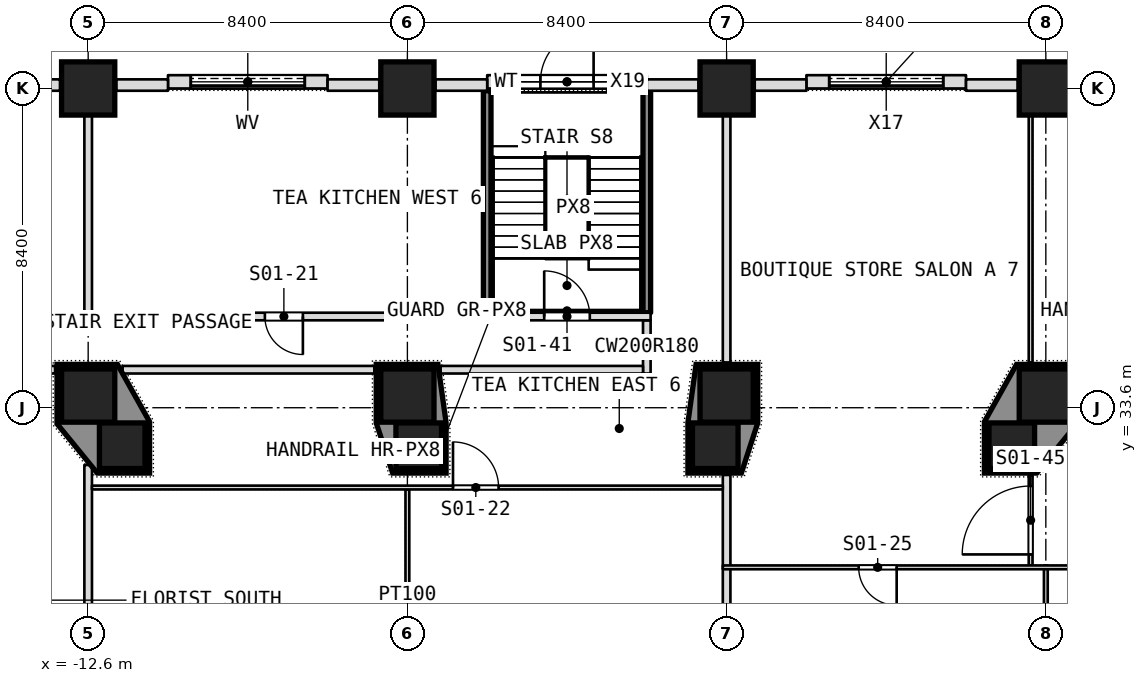
"""IFC4 building model, lengths in metres.
Left out: names, types, materials, properties, quantities, classifications, styles, units other than length and angle.
Written with IfcOpenShell. Run it as: python <this file> out.ifc"""

import sys

from ifc_helpers import new_model, si_unit, direction, frame, frame_2d, origin, origin_2d, place, context, subcontext, project, spatial, polyline, rectangle, outline, extrude, element, fill, save


model = new_model("IFC4")
c1 = context("Model", 3, precision=1e-05, world=origin(), true_north=direction((0.0, 1.0)))
c2 = subcontext(c1, "Body", "Model", "MODEL_VIEW")
j1 = project(units=[si_unit("LENGTHUNIT", "METRE"), si_unit("PLANEANGLEUNIT", "RADIAN")], contexts=[c1])
p1 = place(None, origin())
s1 = spatial("IfcSite", under=j1, at=p1, CompositionType="ELEMENT")
p2 = place(p1, origin())
s2 = spatial("IfcBuilding", under=s1, at=p2, CompositionType="ELEMENT")
p3 = place(p2, origin())
s3 = spatial("IfcBuildingStorey", under=s2, at=p3, CompositionType="ELEMENT", Elevation=0.0)
for number, where, z_axis, x_axis in (
    (1, (-12.6, 33.92, -0.3), (0.0, 0.0, 1.0), (1.0, 0.0, 0.0)),
    (2, (-4.2, 33.92, -0.3), (0.0, 0.0, 1.0), (1.0, 0.0, 0.0)),
    (3, (4.2, 33.92, -0.3), (0.0, 0.0, 1.0), (1.0, 0.0, 0.0)),
    (4, (12.6, 33.92, -0.3), (0.0, 0.0, 1.0), (1.0, 0.0, 0.0)),
    (5, (-12.6, 42.0, -0.3), (0.0, 0.0, 1.0), (1.0, 0.0, 0.0)),
    (6, (-4.2, 42.0, -0.3), (0.0, 0.0, 1.0), (1.0, 0.0, 0.0)),
    (7, (4.2, 42.0, -0.3), (0.0, 0.0, 1.0), (1.0, 0.0, 0.0)),
    (8, (12.6, 42.0, -0.3), (0.0, 0.0, 1.0), (1.0, 0.0, 0.0)),
):
    element("IfcColumn", number, at=place(p3, frame(where, z_axis=z_axis, x_axis=x_axis)), inside=s3, PredefinedType="COLUMN", context=c2, shape_type="SweptSolid", body=[
        extrude(rectangle(XDim=1.4, YDim=1.4, at=origin_2d()), origin(), (0.0, 0.0, 1.0), 8.3),
    ])
for number, where, z_axis, x_axis in (
    (9, (-11.704, 32.6, -0.3), (0.0, 0.0, 1.0), (1.0, 0.0, 0.0)),
    (10, (-3.901, 32.6, -0.3), (0.0, 0.0, 1.0), (1.0, 0.0, 0.0)),
    (11, (3.901, 32.6, -0.3), (0.0, 0.0, 1.0), (1.0, 0.0, 0.0)),
    (12, (11.704, 32.6, -0.3), (0.0, 0.0, 1.0), (1.0, 0.0, 0.0)),
):
    element("IfcColumn", number, at=place(p3, frame(where, z_axis=z_axis, x_axis=x_axis)), inside=s3, PredefinedType="COLUMN", context=c2, shape_type="SweptSolid", body=[
        extrude(rectangle(XDim=1.2, YDim=1.2, at=origin_2d()), origin(), (0.0, 0.0, 1.0), 8.3),
    ])
p4 = place(p3, frame((12.6, 25.92, 0.0), z_axis=(0.0, 0.0, 1.0), x_axis=(0.0, 1.0, 0.0)))
e13 = element("IfcWall", 13, at=p4, inside=s3, PredefinedType="PARTITIONING", context=c2, shape_type="SweptSolid", body=[
    extrude(rectangle(XDim=3.53, YDim=0.1, at=frame_2d((1.765, 0.0))), origin(), (0.0, 0.0, 1.0), 7.68),
])
p5 = place(p3, frame((12.2, 29.45, 0.0), z_axis=(0.0, 0.0, 1.0), x_axis=(0.0, 1.0, 0.0)))
e14 = element("IfcWall", 14, at=p5, inside=s3, PredefinedType="PARTITIONING", context=c2, shape_type="SweptSolid", body=[
    extrude(rectangle(XDim=2.38, YDim=0.1, at=frame_2d((1.19, 0.0))), origin(), (0.0, 0.0, 1.0), 7.68),
])
p6 = place(p5, frame((0.29, 0.0, 0.0)))
e15 = element("IfcOpeningElement", 15, at=p6, cuts=e14, PredefinedType="OPENING", context=c2, shape_type="SweptSolid", body=[
    extrude(rectangle(XDim=1.8, YDim=2.1, at=frame_2d((0.9, 1.05))), frame((0.0, 0.05, 0.0), z_axis=(0.0, -1.0, 0.0), x_axis=(1.0, 0.0, 0.0)), (0.0, 0.0, 1.0), 0.1),
])
p7 = place(p3, frame((12.2, 34.79, 0.0), z_axis=(0.0, 0.0, 1.0), x_axis=(0.0, 1.0, 0.0)))
e16 = element("IfcWall", 16, at=p7, inside=s3, PredefinedType="PARTITIONING", context=c2, shape_type="SweptSolid", body=[
    extrude(rectangle(XDim=7.51, YDim=0.1, at=frame_2d((3.755, 0.0))), origin(), (0.0, 0.0, 1.0), 7.68),
])
p8 = place(p3, frame((4.2, 21.1, 0.0), z_axis=(0.0, 0.0, 1.0), x_axis=(0.0, 1.0, 0.0)))
e17 = element("IfcWall", 17, at=p8, inside=s3, PredefinedType="PARTITIONING", context=c2, shape_type="SweptSolid", body=[
    extrude(rectangle(XDim=10.73, YDim=0.2, at=frame_2d((5.365, 0.0))), origin(), (0.0, 0.0, 1.0), 7.68),
])
p9 = place(p3, frame((4.2, 34.79, 0.0), z_axis=(0.0, 0.0, 1.0), x_axis=(0.0, 1.0, 0.0)))
e18 = element("IfcWall", 18, at=p9, inside=s3, PredefinedType="PARTITIONING", context=c2, shape_type="SweptSolid", body=[
    extrude(rectangle(XDim=7.51, YDim=0.2, at=frame_2d((3.755, 0.0))), origin(), (0.0, 0.0, 1.0), 7.68),
])
p10 = place(p3, frame((2.1, 36.1, 0.0), z_axis=(0.0, 0.0, 1.0), x_axis=(0.0, 1.0, 0.0)))
e19 = element("IfcWall", 19, at=p10, inside=s3, PredefinedType="PARTITIONING", context=c2, shape_type="SweptSolid", body=[
    extrude(rectangle(XDim=5.84, YDim=0.2, at=frame_2d((2.92, 0.0))), origin(), (0.0, 0.0, 1.0), 7.68),
])
p11 = place(p3, frame((2.1, 34.5, 0.0), z_axis=(0.0, 0.0, 1.0), x_axis=(0.0, 1.0, 0.0)))
e20 = element("IfcWall", 20, at=p11, inside=s3, PredefinedType="PARTITIONING", context=c2, shape_type="SweptSolid", body=[
    extrude(rectangle(XDim=1.4, YDim=0.2, at=frame_2d((0.7, 0.0))), origin(), (0.0, 0.0, 1.0), 7.68),
])
p12 = place(p3, frame((-2.1, 36.1, 0.0), z_axis=(0.0, 0.0, 1.0), x_axis=(0.0, 1.0, 0.0)))
e21 = element("IfcWall", 21, at=p12, inside=s3, PredefinedType="PARTITIONING", context=c2, shape_type="SweptSolid", body=[
    extrude(rectangle(XDim=5.84, YDim=0.2, at=frame_2d((2.92, 0.0))), origin(), (0.0, 0.0, 1.0), 7.68),
])
p13 = place(p3, frame((-4.2, 25.92, 0.0), z_axis=(0.0, 0.0, 1.0), x_axis=(0.0, 1.0, 0.0)))
e22 = element("IfcWall", 22, at=p13, inside=s3, PredefinedType="PARTITIONING", context=c2, shape_type="SweptSolid", body=[
    extrude(rectangle(XDim=5.53, YDim=0.1, at=frame_2d((2.765, 0.0))), origin(), (0.0, 0.0, 1.0), 7.68),
])
p14 = place(p3, frame((-12.6, 21.1, 0.0), z_axis=(0.0, 0.0, 1.0), x_axis=(0.0, 1.0, 0.0)))
e23 = element("IfcWall", 23, at=p14, inside=s3, PredefinedType="PARTITIONING", context=c2, shape_type="SweptSolid", body=[
    extrude(rectangle(XDim=10.994, YDim=0.2, at=frame_2d((5.497, 0.0))), origin(), (0.0, 0.0, 1.0), 7.68),
])
p15 = place(p3, frame((-12.6, 36.1, 0.0), z_axis=(0.0, 0.0, 1.0), x_axis=(0.0, 1.0, 0.0)))
e24 = element("IfcWall", 24, at=p15, inside=s3, PredefinedType="PARTITIONING", context=c2, shape_type="SweptSolid", body=[
    extrude(rectangle(XDim=6.2, YDim=0.2, at=frame_2d((3.1, 0.0))), origin(), (0.0, 0.0, 1.0), 7.68),
])
p16 = place(p3, frame((4.1, 29.4, 0.0), z_axis=(0.0, 0.0, 1.0), x_axis=(1.0, 0.0, 0.0)))
e25 = element("IfcWall", 25, at=p16, inside=s3, PredefinedType="PARTITIONING", context=c2, shape_type="SweptSolid", body=[
    extrude(rectangle(XDim=12.6, YDim=0.1, at=frame_2d((6.3, 0.0))), origin(), (0.0, 0.0, 1.0), 7.68),
])
p17 = place(p16, frame((3.575, 0.0, 0.0)))
e26 = element("IfcOpeningElement", 26, at=p17, cuts=e25, PredefinedType="OPENING", context=c2, shape_type="SweptSolid", body=[
    extrude(rectangle(XDim=1.0, YDim=2.1, at=frame_2d((0.5, 1.05))), frame((0.0, 0.05, 0.0), z_axis=(0.0, -1.0, 0.0), x_axis=(1.0, 0.0, 0.0)), (0.0, 0.0, 1.0), 0.1),
])
p18 = place(p3, frame((-12.5, 31.5, 0.0), z_axis=(0.0, 0.0, 1.0), x_axis=(1.0, 0.0, 0.0)))
e27 = element("IfcWall", 27, at=p18, inside=s3, PredefinedType="PARTITIONING", context=c2, shape_type="SweptSolid", body=[
    extrude(rectangle(XDim=16.6, YDim=0.1, at=frame_2d((8.3, 0.0))), origin(), (0.0, 0.0, 1.0), 7.68),
])
p19 = place(p18, frame((9.5, 0.0, 0.0)))
e28 = element("IfcOpeningElement", 28, at=p19, cuts=e27, PredefinedType="OPENING", context=c2, shape_type="SweptSolid", body=[
    extrude(rectangle(XDim=1.2, YDim=2.1, at=frame_2d((0.6, 1.05))), frame((0.0, 0.05, 0.0), z_axis=(0.0, -1.0, 0.0), x_axis=(1.0, 0.0, 0.0)), (0.0, 0.0, 1.0), 0.1),
])
p20 = place(p3, frame((-16.7, 34.6, 0.0), z_axis=(0.0, 0.0, 1.0), x_axis=(1.0, 0.0, 0.0)))
e29 = element("IfcWall", 29, at=p20, inside=s3, PredefinedType="PARTITIONING", context=c2, shape_type="SweptSolid", body=[
    extrude(rectangle(XDim=3.23, YDim=0.2, at=frame_2d((1.615, 0.0))), origin(), (0.0, 0.0, 1.0), 7.68),
])
p21 = place(p3, frame((-11.694, 34.6, 0.0), z_axis=(0.0, 0.0, 1.0), x_axis=(1.0, 0.0, 0.0)))
e30 = element("IfcWall", 30, at=p21, inside=s3, PredefinedType="PARTITIONING", context=c2, shape_type="SweptSolid", body=[
    extrude(rectangle(XDim=6.624, YDim=0.2, at=frame_2d((3.312, 0.0))), origin(), (0.0, 0.0, 1.0), 7.68),
])
p22 = place(p3, frame((-3.326, 34.6, 0.0), z_axis=(0.0, 0.0, 1.0), x_axis=(1.0, 0.0, 0.0)))
e31 = element("IfcWall", 31, at=p22, inside=s3, PredefinedType="PARTITIONING", context=c2, shape_type="SweptSolid", body=[
    extrude(rectangle(XDim=5.326, YDim=0.2, at=frame_2d((2.663, 0.0))), origin(), (0.0, 0.0, 1.0), 7.68),
])
p23 = place(p3, frame((-21.1, 36.0, 0.0), z_axis=(0.0, 0.0, 1.0), x_axis=(1.0, 0.0, 0.0)))
e32 = element("IfcWall", 32, at=p23, inside=s3, PredefinedType="PARTITIONING", context=c2, shape_type="SweptSolid", body=[
    extrude(rectangle(XDim=23.3, YDim=0.2, at=frame_2d((11.65, 0.0))), origin(), (0.0, 0.0, 1.0), 7.68),
])
p24 = place(p23, frame((1.6, 0.0, 0.0)))
e33 = element("IfcOpeningElement", 33, at=p24, cuts=e32, PredefinedType="OPENING", context=c2, shape_type="SweptSolid", body=[
    extrude(rectangle(XDim=1.2, YDim=2.1, at=frame_2d((0.6, 1.05))), frame((0.0, 0.1, 0.0), z_axis=(0.0, -1.0, 0.0), x_axis=(1.0, 0.0, 0.0)), (0.0, 0.0, 1.0), 0.2),
])
p25 = place(p23, frame((6.0, 0.0, 0.0)))
e34 = element("IfcOpeningElement", 34, at=p25, cuts=e32, PredefinedType="OPENING", context=c2, shape_type="SweptSolid", body=[
    extrude(rectangle(XDim=1.0, YDim=2.1, at=frame_2d((0.5, 1.05))), frame((0.0, 0.1, 0.0), z_axis=(0.0, -1.0, 0.0), x_axis=(1.0, 0.0, 0.0)), (0.0, 0.0, 1.0), 0.2),
])
p26 = place(p23, frame((13.15, 0.0, 0.0)))
e35 = element("IfcOpeningElement", 35, at=p26, cuts=e32, PredefinedType="OPENING", context=c2, shape_type="SweptSolid", body=[
    extrude(rectangle(XDim=1.0, YDim=2.1, at=frame_2d((0.5, 1.05))), frame((0.0, 0.1, 0.0), z_axis=(0.0, -1.0, 0.0), x_axis=(1.0, 0.0, 0.0)), (0.0, 0.0, 1.0), 0.2),
])
p27 = place(p23, frame((20.5, 0.0, 0.0)))
e36 = element("IfcOpeningElement", 36, at=p27, cuts=e32, PredefinedType="OPENING", context=c2, shape_type="SweptSolid", body=[
    extrude(rectangle(XDim=1.2, YDim=2.1, at=frame_2d((0.6, 1.05))), frame((0.0, 0.1, 0.0), z_axis=(0.0, -1.0, 0.0), x_axis=(1.0, 0.0, 0.0)), (0.0, 0.0, 1.0), 0.2),
])
p28 = place(p3, frame((-6.3, 42.175, 0.0), z_axis=(0.0, 0.0, 1.0), x_axis=(-1.0, 0.0, 0.0)))
e37 = element("IfcWall", 37, at=p28, inside=s3, PredefinedType="NOTDEFINED", context=c2, shape_type="SweptSolid", body=[
    extrude(rectangle(XDim=4.2, YDim=0.35, at=frame_2d((2.1, 0.0))), origin(), (0.0, 0.0, 1.0), 6.78),
])
p29 = place(p28, frame((0.6, 0.0, 0.0)))
e38 = element("IfcOpeningElement", 38, at=p29, cuts=e37, PredefinedType="OPENING", context=c2, shape_type="SweptSolid", body=[
    extrude(rectangle(XDim=3.0, YDim=3.0, at=frame_2d((1.5, 1.5))), frame((0.0, 0.175, 0.0), z_axis=(0.0, -1.0, 0.0), x_axis=(1.0, 0.0, 0.0)), (0.0, 0.0, 1.0), 0.35),
])
p30 = place(p28, frame((0.6, 0.0, 3.1)))
e39 = element("IfcOpeningElement", 39, at=p30, cuts=e37, PredefinedType="OPENING", context=c2, shape_type="SweptSolid", body=[
    extrude(rectangle(XDim=3.0, YDim=2.4, at=frame_2d((1.5, 1.2))), frame((0.0, 0.175, 0.0), z_axis=(0.0, -1.0, 0.0), x_axis=(1.0, 0.0, 0.0)), (0.0, 0.0, 1.0), 0.35),
])
p31 = place(p3, frame((10.5, 42.175, 0.0), z_axis=(0.0, 0.0, 1.0), x_axis=(-1.0, 0.0, 0.0)))
e40 = element("IfcWall", 40, at=p31, inside=s3, PredefinedType="NOTDEFINED", context=c2, shape_type="SweptSolid", body=[
    extrude(rectangle(XDim=4.2, YDim=0.35, at=frame_2d((2.1, 0.0))), origin(), (0.0, 0.0, 1.0), 6.78),
])
p32 = place(p31, frame((0.6, 0.0, 0.0)))
e41 = element("IfcOpeningElement", 41, at=p32, cuts=e40, PredefinedType="OPENING", context=c2, shape_type="SweptSolid", body=[
    extrude(rectangle(XDim=3.0, YDim=3.0, at=frame_2d((1.5, 1.5))), frame((0.0, 0.175, 0.0), z_axis=(0.0, -1.0, 0.0), x_axis=(1.0, 0.0, 0.0)), (0.0, 0.0, 1.0), 0.35),
])
p33 = place(p31, frame((0.6, 0.0, 3.1)))
e42 = element("IfcOpeningElement", 42, at=p33, cuts=e40, PredefinedType="OPENING", context=c2, shape_type="SweptSolid", body=[
    extrude(rectangle(XDim=3.0, YDim=2.4, at=frame_2d((1.5, 1.2))), frame((0.0, 0.175, 0.0), z_axis=(0.0, -1.0, 0.0), x_axis=(1.0, 0.0, 0.0)), (0.0, 0.0, 1.0), 0.35),
])
p34 = place(p3, frame((2.1, 42.175, 0.0), z_axis=(0.0, 0.0, 1.0), x_axis=(-1.0, 0.0, 0.0)))
e43 = element("IfcWall", 43, at=p34, inside=s3, PredefinedType="NOTDEFINED", context=c2, shape_type="SweptSolid", body=[
    extrude(rectangle(XDim=4.2, YDim=0.35, at=frame_2d((2.1, 0.0))), origin(), (0.0, 0.0, 1.0), 8.0),
])
p35 = place(p34, frame((1.4, 0.0, 0.0)))
e44 = element("IfcOpeningElement", 44, at=p35, cuts=e43, PredefinedType="OPENING", context=c2, shape_type="SweptSolid", body=[
    extrude(rectangle(XDim=1.4, YDim=2.2, at=frame_2d((0.7, 1.1))), frame((0.0, 0.175, 0.0), z_axis=(0.0, -1.0, 0.0), x_axis=(1.0, 0.0, 0.0)), (0.0, 0.0, 1.0), 0.35),
])
p36 = place(p34, frame((0.6, 0.0, 2.9)))
e45 = element("IfcOpeningElement", 45, at=p36, cuts=e43, PredefinedType="OPENING", context=c2, shape_type="SweptSolid", body=[
    extrude(rectangle(XDim=3.0, YDim=2.6, at=frame_2d((1.5, 1.3))), frame((0.0, 0.175, 0.0), z_axis=(0.0, -1.0, 0.0), x_axis=(1.0, 0.0, 0.0)), (0.0, 0.0, 1.0), 0.35),
])
for number, where, z_axis, x_axis in (
    (46, (11.86, 42.09, 0.0), (0.0, 0.0, 1.0), (-1.0, 0.0, 0.0)),
    (47, (6.3, 42.09, 0.0), (0.0, 0.0, 1.0), (-1.0, 0.0, 0.0)),
):
    element("IfcWall", number, at=place(p3, frame(where, z_axis=z_axis, x_axis=x_axis)), inside=s3, PredefinedType="NOTDEFINED", context=c2, shape_type="SweptSolid", body=[
        extrude(rectangle(XDim=1.36, YDim=0.3, at=frame_2d((0.68, 0.0))), origin(), (0.0, 0.0, 1.0), 6.78),
    ])
for number, where, z_axis, x_axis in (
    (48, (3.46, 42.09, 0.0), (0.0, 0.0, 1.0), (-1.0, 0.0, 0.0)),
    (49, (-2.1, 42.09, 0.0), (0.0, 0.0, 1.0), (-1.0, 0.0, 0.0)),
):
    element("IfcWall", number, at=place(p3, frame(where, z_axis=z_axis, x_axis=x_axis)), inside=s3, PredefinedType="NOTDEFINED", context=c2, shape_type="SweptSolid", body=[
        extrude(rectangle(XDim=1.36, YDim=0.3, at=frame_2d((0.68, 0.0))), origin(), (0.0, 0.0, 1.0), 6.78),
    ])
for number, where, z_axis, x_axis in (
    (50, (-4.94, 42.09, 0.0), (0.0, 0.0, 1.0), (-1.0, 0.0, 0.0)),
    (51, (-10.5, 42.09, 0.0), (0.0, 0.0, 1.0), (-1.0, 0.0, 0.0)),
):
    element("IfcWall", number, at=place(p3, frame(where, z_axis=z_axis, x_axis=x_axis)), inside=s3, PredefinedType="NOTDEFINED", context=c2, shape_type="SweptSolid", body=[
        extrude(rectangle(XDim=1.36, YDim=0.3, at=frame_2d((0.68, 0.0))), origin(), (0.0, 0.0, 1.0), 6.78),
    ])
p37 = place(p3, frame((-13.34, 42.09, 0.0), z_axis=(0.0, 0.0, 1.0), x_axis=(-1.0, 0.0, 0.0)))
e52 = element("IfcWall", 52, at=p37, inside=s3, PredefinedType="NOTDEFINED", context=c2, shape_type="SweptSolid", body=[
    extrude(rectangle(XDim=2.66, YDim=0.3, at=frame_2d((1.33, 0.0))), origin(), (0.0, 0.0, 1.0), 6.78),
])
p38 = place(p3, origin())
e53 = element("IfcWall", 53, at=p38, inside=s3, PredefinedType="SOLIDWALL", context=c2, shape_type="SweptSolid", body=[
    extrude(outline(polyline([(-13.42, 34.74), (-11.83, 34.74), (-10.984, 33.231), (-10.984, 31.88), (-12.361, 31.88), (-13.42, 33.177), (-13.42, 34.74)]), holes=[polyline([(-11.104, 32.0), (-11.104, 33.2), (-12.304, 33.2), (-12.304, 32.0), (-11.104, 32.0)]), polyline([(-11.9, 33.22), (-11.9, 34.62), (-13.3, 34.62), (-13.3, 33.22), (-11.9, 33.22)])]), origin(), (0.0, 0.0, 1.0), 8.0),
])
p39 = place(p3, origin())
e54 = element("IfcWall", 54, at=p39, inside=s3, PredefinedType="SOLIDWALL", context=c2, shape_type="SweptSolid", body=[
    extrude(outline(polyline([(-5.02, 34.74), (-3.396, 34.74), (-3.181, 33.208), (-3.181, 31.88), (-4.588, 31.88), (-5.02, 33.201), (-5.02, 34.74)]), holes=[polyline([(-3.302, 32.0), (-3.302, 33.2), (-4.501, 33.2), (-4.501, 32.0), (-3.302, 32.0)]), polyline([(-3.5, 33.22), (-3.5, 34.62), (-4.9, 34.62), (-4.9, 33.22), (-3.5, 33.22)])]), origin(), (0.0, 0.0, 1.0), 8.0),
])
p40 = place(p3, origin())
e55 = element("IfcWall", 55, at=p40, inside=s3, PredefinedType="SOLIDWALL", context=c2, shape_type="SweptSolid", body=[
    extrude(outline(polyline([(3.181, 33.208), (3.396, 34.74), (5.02, 34.74), (5.02, 33.201), (4.588, 31.88), (3.181, 31.88), (3.181, 33.208)]), holes=[polyline([(3.5, 33.22), (4.9, 33.22), (4.9, 34.62), (3.5, 34.62), (3.5, 33.22)]), polyline([(3.302, 32.0), (4.501, 32.0), (4.501, 33.2), (3.302, 33.2), (3.302, 32.0)])]), origin(), (0.0, 0.0, 1.0), 8.0),
])
p41 = place(p3, origin())
e56 = element("IfcWall", 56, at=p41, inside=s3, PredefinedType="SOLIDWALL", context=c2, shape_type="SweptSolid", body=[
    extrude(outline(polyline([(11.83, 34.74), (13.42, 34.74), (13.42, 33.177), (12.361, 31.88), (10.984, 31.88), (10.984, 33.231), (11.83, 34.74)]), holes=[polyline([(13.3, 33.22), (13.3, 34.62), (11.9, 34.62), (11.9, 33.22), (13.3, 33.22)]), polyline([(12.304, 32.0), (12.304, 33.2), (11.104, 33.2), (11.104, 32.0), (12.304, 32.0)])]), origin(), (0.0, 0.0, 1.0), 8.0),
])
p42 = place(p6, origin())
e57 = element("IfcDoor", 57, at=p42, inside=s3, OperationType="DOUBLE_DOOR_SINGLE_SWING", PredefinedType="DOOR", context=c2, shape_type="SweptSolid", body=[
    extrude(rectangle(XDim=1.8, YDim=2.1, at=frame_2d((0.9, 1.05))), frame((0.0, 0.025, 0.0), z_axis=(0.0, -1.0, 0.0), x_axis=(1.0, 0.0, 0.0)), (0.0, 0.0, 1.0), 0.05),
])
fill(e15, e57)
p43 = place(p17, origin())
e58 = element("IfcDoor", 58, at=p43, inside=s3, OperationType="SINGLE_SWING_LEFT", PredefinedType="DOOR", context=c2, shape_type="SweptSolid", body=[
    extrude(rectangle(XDim=1.0, YDim=2.1, at=frame_2d((0.5, 1.05))), frame((0.0, 0.025, 0.0), z_axis=(0.0, -1.0, 0.0), x_axis=(1.0, 0.0, 0.0)), (0.0, 0.0, 1.0), 0.05),
])
fill(e26, e58)
p44 = place(p19, origin())
e59 = element("IfcDoor", 59, at=p44, inside=s3, OperationType="SINGLE_SWING_LEFT", PredefinedType="DOOR", context=c2, shape_type="SweptSolid", body=[
    extrude(rectangle(XDim=1.2, YDim=2.1, at=frame_2d((0.6, 1.05))), frame((0.0, 0.025, 0.0), z_axis=(0.0, -1.0, 0.0), x_axis=(1.0, 0.0, 0.0)), (0.0, 0.0, 1.0), 0.05),
])
fill(e28, e59)
p45 = place(p26, origin())
e60 = element("IfcDoor", 60, at=p45, inside=s3, OperationType="SINGLE_SWING_RIGHT", PredefinedType="DOOR", context=c2, shape_type="SweptSolid", body=[
    extrude(rectangle(XDim=1.0, YDim=2.1, at=frame_2d((0.5, 1.05))), frame((0.0, 0.025, 0.0), z_axis=(0.0, -1.0, 0.0), x_axis=(1.0, 0.0, 0.0)), (0.0, 0.0, 1.0), 0.05),
])
fill(e35, e60)
p46 = place(p27, origin())
e61 = element("IfcDoor", 61, at=p46, inside=s3, OperationType="SINGLE_SWING_LEFT", PredefinedType="DOOR", context=c2, shape_type="SweptSolid", body=[
    extrude(rectangle(XDim=1.2, YDim=2.1, at=frame_2d((0.6, 1.05))), frame((0.0, 0.025, 0.0), z_axis=(0.0, -1.0, 0.0), x_axis=(1.0, 0.0, 0.0)), (0.0, 0.0, 1.0), 0.05),
])
fill(e36, e61)
p47 = place(p29, frame((3.0, 0.0, 0.0), z_axis=(0.0, 0.0, 1.0), x_axis=(-1.0, 0.0, 0.0)))
e62 = element("IfcDoor", 62, at=p47, inside=s3, OperationType="SLIDING_TO_LEFT", PredefinedType="DOOR", context=c2, shape_type="SweptSolid", body=[
    extrude(rectangle(XDim=3.0, YDim=3.0, at=frame_2d((1.5, 1.5))), frame((0.0, 0.025, 0.0), z_axis=(0.0, -1.0, 0.0), x_axis=(1.0, 0.0, 0.0)), (0.0, 0.0, 1.0), 0.05),
])
fill(e38, e62)
p48 = place(p30, origin())
e63 = element("IfcWindow", 63, at=p48, inside=s3, PartitioningType="SINGLE_PANEL", PredefinedType="WINDOW", context=c2, shape_type="SweptSolid", body=[
    extrude(rectangle(XDim=3.0, YDim=2.4, at=frame_2d((1.5, 1.2))), frame((0.0, 0.03, 0.0), z_axis=(0.0, -1.0, 0.0), x_axis=(1.0, 0.0, 0.0)), (0.0, 0.0, 1.0), 0.06),
])
fill(e39, e63)
p49 = place(p32, frame((3.0, 0.0, 0.0), z_axis=(0.0, 0.0, 1.0), x_axis=(-1.0, 0.0, 0.0)))
e64 = element("IfcDoor", 64, at=p49, inside=s3, OperationType="SLIDING_TO_LEFT", PredefinedType="DOOR", context=c2, shape_type="SweptSolid", body=[
    extrude(rectangle(XDim=3.0, YDim=3.0, at=frame_2d((1.5, 1.5))), frame((0.0, 0.025, 0.0), z_axis=(0.0, -1.0, 0.0), x_axis=(1.0, 0.0, 0.0)), (0.0, 0.0, 1.0), 0.05),
])
fill(e41, e64)
p50 = place(p33, origin())
e65 = element("IfcWindow", 65, at=p50, inside=s3, PartitioningType="SINGLE_PANEL", PredefinedType="WINDOW", context=c2, shape_type="SweptSolid", body=[
    extrude(rectangle(XDim=3.0, YDim=2.4, at=frame_2d((1.5, 1.2))), frame((0.0, 0.03, 0.0), z_axis=(0.0, -1.0, 0.0), x_axis=(1.0, 0.0, 0.0)), (0.0, 0.0, 1.0), 0.06),
])
fill(e42, e65)
p51 = place(p35, frame((1.4, 0.0, 0.0), z_axis=(0.0, 0.0, 1.0), x_axis=(-1.0, 0.0, 0.0)))
e66 = element("IfcDoor", 66, at=p51, inside=s3, OperationType="SINGLE_SWING_LEFT", PredefinedType="DOOR", context=c2, shape_type="SweptSolid", body=[
    extrude(rectangle(XDim=1.4, YDim=2.2, at=frame_2d((0.7, 1.1))), frame((0.0, 0.025, 0.0), z_axis=(0.0, -1.0, 0.0), x_axis=(1.0, 0.0, 0.0)), (0.0, 0.0, 1.0), 0.05),
])
fill(e44, e66)
p52 = place(p36, origin())
e67 = element("IfcWindow", 67, at=p52, inside=s3, PartitioningType="SINGLE_PANEL", PredefinedType="WINDOW", context=c2, shape_type="SweptSolid", body=[
    extrude(rectangle(XDim=3.0, YDim=2.6, at=frame_2d((1.5, 1.3))), frame((0.0, 0.03, 0.0), z_axis=(0.0, -1.0, 0.0), x_axis=(1.0, 0.0, 0.0)), (0.0, 0.0, 1.0), 0.06),
])
fill(e45, e67)
save(model, sys.argv[1])
